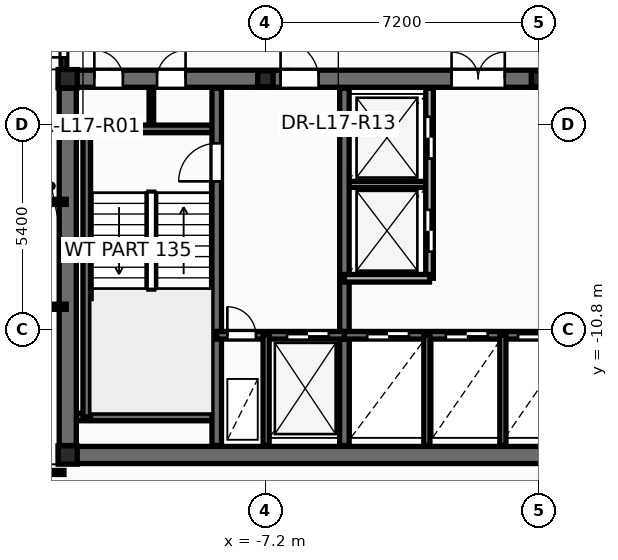
"""IFC4 building model, lengths in metres.
Left out: names, types, materials, properties, quantities, classifications, styles, units other than length and angle.
Written with IfcOpenShell. Run it as: python <this file> out.ifc"""

import sys

from ifc_helpers import new_model, si_unit, direction, frame, frame_2d, origin, origin_2d, place, context, subcontext, project, spatial, rectangle, i_section, extrude, element, fill, save


model = new_model("IFC4")
c1 = context("Model", 3, precision=1e-05, world=origin(), true_north=direction((0.0, 1.0)))
c2 = subcontext(c1, "Body", "Model", "MODEL_VIEW")
j1 = project(units=[si_unit("LENGTHUNIT", "METRE"), si_unit("PLANEANGLEUNIT", "RADIAN")], contexts=[c1])
p1 = place(None, origin())
s1 = spatial("IfcSite", under=j1, at=p1, CompositionType="ELEMENT")
p2 = place(p1, origin())
s2 = spatial("IfcBuilding", under=s1, at=p2, CompositionType="ELEMENT")
p3 = place(p2, frame((0.0, 0.0, 68.4)))
s3 = spatial("IfcBuildingStorey", under=s2, at=p3, CompositionType="ELEMENT", Elevation=68.4)
for number, where, z_axis, x_axis in (
    (1, (-12.4, -14.1, 0.0), (0.0, 0.0, 1.0), (1.0, 0.0, 0.0)),
    (2, (-12.4, -4.2, 0.0), (0.0, 0.0, 1.0), (1.0, 0.0, 0.0)),
):
    element("IfcColumn", number, at=place(p3, frame(where, z_axis=z_axis, x_axis=x_axis)), inside=s3, PredefinedType="COLUMN", context=c2, shape_type="SweptSolid", body=[
        extrude(i_section(OverallWidth=0.5, OverallDepth=0.482, WebThickness=0.04, FlangeThickness=0.045, at=origin_2d()), origin(), (0.0, 0.0, 1.0), 3.6),
    ])
for number, where, z_axis, x_axis in (
    (3, (-7.2, -4.2, 0.0), (0.0, 0.0, 1.0), (1.0, 0.0, 0.0)),
    (4, (0.0, -4.2, 0.0), (0.0, 0.0, 1.0), (1.0, 0.0, 0.0)),
):
    element("IfcColumn", number, at=place(p3, frame(where, z_axis=z_axis, x_axis=x_axis)), inside=s3, PredefinedType="PILASTER", context=c2, shape_type="SweptSolid", body=[
        extrude(i_section(OverallWidth=0.405, OverallDepth=0.414, WebThickness=0.022, FlangeThickness=0.032, at=origin_2d()), origin(), (0.0, 0.0, 1.0), 3.6),
    ])
p4 = place(p3, frame((-5.12, -6.98, 0.0), z_axis=(0.0, 0.0, 1.0), x_axis=(1.0, 0.0, 0.0)))
e5 = element("IfcWall", 5, at=p4, inside=s3, PredefinedType="PARTITIONING", context=c2, shape_type="SweptSolid", body=[
    extrude(rectangle(XDim=2.24, YDim=0.16, at=frame_2d((1.12, 0.0))), origin(), (0.0, 0.0, 1.0), 3.35),
])
p5 = place(p3, frame((-10.2, -5.52, 0.0), z_axis=(0.0, 0.0, 1.0), x_axis=(0.0, 1.0, 0.0)))
e6 = element("IfcWall", 6, at=p5, inside=s3, PredefinedType="PARTITIONING", context=c2, shape_type="SweptSolid", body=[
    extrude(rectangle(XDim=1.12, YDim=0.12, at=frame_2d((0.56, 0.0))), origin(), (0.0, 0.0, 1.0), 3.35),
])
p6 = place(p3, frame((-12.65, -14.1, 0.0), z_axis=(0.0, 0.0, 1.0), x_axis=(1.0, 0.0, 0.0)))
e7 = element("IfcWall", 7, at=p6, inside=s3, PredefinedType="SHEAR", context=c2, shape_type="SweptSolid", body=[
    extrude(rectangle(XDim=25.3, YDim=0.45, at=frame_2d((12.65, 0.0))), origin(), (0.0, 0.0, 1.0), 3.6),
])
p7 = place(p3, frame((-12.65, -4.2, 0.0), z_axis=(0.0, 0.0, 1.0), x_axis=(1.0, 0.0, 0.0)))
e8 = element("IfcWall", 8, at=p7, inside=s3, PredefinedType="SHEAR", context=c2, shape_type="SweptSolid", body=[
    extrude(rectangle(XDim=25.3, YDim=0.45, at=frame_2d((12.65, 0.0))), origin(), (0.0, 0.0, 1.0), 3.6),
])
p8 = place(p7, frame((0.95, 0.0, 0.0)))
e9 = element("IfcOpeningElement", 9, at=p8, cuts=e8, PredefinedType="OPENING", context=c2, shape_type="SweptSolid", body=[
    extrude(rectangle(XDim=0.756, YDim=2.054, at=frame_2d((0.375, 1.027))), frame((0.0, 0.235, 0.0), z_axis=(0.0, -1.0, 0.0), x_axis=(1.0, 0.0, 0.0)), (0.0, 0.0, 1.0), 0.47),
])
p9 = place(p7, frame((2.6, 0.0, 0.0)))
e10 = element("IfcOpeningElement", 10, at=p9, cuts=e8, PredefinedType="OPENING", context=c2, shape_type="SweptSolid", body=[
    extrude(rectangle(XDim=0.756, YDim=2.054, at=frame_2d((0.375, 1.027))), frame((0.0, 0.235, 0.0), z_axis=(0.0, -1.0, 0.0), x_axis=(1.0, 0.0, 0.0)), (0.0, 0.0, 1.0), 0.47),
])
p10 = place(p7, frame((21.85, 0.0, 0.0)))
e11 = element("IfcOpeningElement", 11, at=p10, cuts=e8, PredefinedType="OPENING", context=c2, shape_type="SweptSolid", body=[
    extrude(rectangle(XDim=0.756, YDim=2.054, at=frame_2d((0.375, 1.027))), frame((0.0, 0.235, 0.0), z_axis=(0.0, -1.0, 0.0), x_axis=(1.0, 0.0, 0.0)), (0.0, 0.0, 1.0), 0.47),
])
p11 = place(p7, frame((23.5, 0.0, 0.0)))
e12 = element("IfcOpeningElement", 12, at=p11, cuts=e8, PredefinedType="OPENING", context=c2, shape_type="SweptSolid", body=[
    extrude(rectangle(XDim=0.756, YDim=2.054, at=frame_2d((0.375, 1.027))), frame((0.0, 0.235, 0.0), z_axis=(0.0, -1.0, 0.0), x_axis=(1.0, 0.0, 0.0)), (0.0, 0.0, 1.0), 0.47),
])
p12 = place(p7, frame((5.85, 0.0, 0.0)))
e13 = element("IfcOpeningElement", 13, at=p12, cuts=e8, PredefinedType="OPENING", context=c2, shape_type="SweptSolid", body=[
    extrude(rectangle(XDim=1.006, YDim=2.104, at=frame_2d((0.5, 1.052))), frame((0.0, 0.235, 0.0), z_axis=(0.0, -1.0, 0.0), x_axis=(1.0, 0.0, 0.0)), (0.0, 0.0, 1.0), 0.47),
])
p13 = place(p7, frame((10.35, 0.0, 0.0)))
e14 = element("IfcOpeningElement", 14, at=p13, cuts=e8, PredefinedType="OPENING", context=c2, shape_type="SweptSolid", body=[
    extrude(rectangle(XDim=1.406, YDim=2.154, at=frame_2d((0.7, 1.077))), frame((0.0, 0.235, 0.0), z_axis=(0.0, -1.0, 0.0), x_axis=(1.0, 0.0, 0.0)), (0.0, 0.0, 1.0), 0.47),
])
p14 = place(p7, frame((18.45, 0.0, 0.0)))
e15 = element("IfcOpeningElement", 15, at=p14, cuts=e8, PredefinedType="OPENING", context=c2, shape_type="SweptSolid", body=[
    extrude(rectangle(XDim=1.006, YDim=2.104, at=frame_2d((0.5, 1.052))), frame((0.0, 0.235, 0.0), z_axis=(0.0, -1.0, 0.0), x_axis=(1.0, 0.0, 0.0)), (0.0, 0.0, 1.0), 0.47),
])
for number, where, z_axis, x_axis in (
    (16, (-12.35, -5.52, 0.0), (0.0, 0.0, 1.0), (1.0, 0.0, 0.0)),
    (17, (-12.35, -13.1, 0.0), (0.0, 0.0, 1.0), (1.0, 0.0, 0.0)),
):
    element("IfcWall", number, at=place(p3, frame(where, z_axis=z_axis, x_axis=x_axis)), inside=s3, PredefinedType="SOLIDWALL", context=c2, shape_type="SweptSolid", body=[
        extrude(rectangle(XDim=3.87, YDim=0.2, at=frame_2d((1.935, 0.0))), origin(), (0.0, 0.0, 1.0), 3.6),
    ])
p15 = place(p3, frame((-11.9, -13.1, 0.0), z_axis=(0.0, 0.0, 1.0), x_axis=(0.0, 1.0, 0.0)))
e18 = element("IfcWall", 18, at=p15, inside=s3, PredefinedType="SOLIDWALL", context=c2, shape_type="SweptSolid", body=[
    extrude(rectangle(XDim=7.58, YDim=0.2, at=frame_2d((3.79, 0.0))), origin(), (0.0, 0.0, 1.0), 3.6),
])
p16 = place(p3, frame((-8.48, -13.85, 0.0), z_axis=(0.0, 0.0, 1.0), x_axis=(0.0, 1.0, 0.0)))
e19 = element("IfcWall", 19, at=p16, inside=s3, PredefinedType="SHEAR", context=c2, shape_type="SweptSolid", body=[
    extrude(rectangle(XDim=9.4, YDim=0.25, at=frame_2d((4.7, 0.0))), origin(), (0.0, 0.0, 1.0), 3.6),
])
p17 = place(p16, frame((6.95, 0.0, 0.0)))
e20 = element("IfcOpeningElement", 20, at=p17, cuts=e19, PredefinedType="OPENING", context=c2, shape_type="SweptSolid", body=[
    extrude(rectangle(XDim=1.006, YDim=2.104, at=frame_2d((0.5, 1.052))), frame((0.0, 0.135, 0.0), z_axis=(0.0, -1.0, 0.0), x_axis=(1.0, 0.0, 0.0)), (0.0, 0.0, 1.0), 0.27),
])
p18 = place(p3, frame((-5.12, -13.85, 0.0), z_axis=(0.0, 0.0, 1.0), x_axis=(0.0, 1.0, 0.0)))
e21 = element("IfcWall", 21, at=p18, inside=s3, PredefinedType="SHEAR", context=c2, shape_type="SweptSolid", body=[
    extrude(rectangle(XDim=9.4, YDim=0.25, at=frame_2d((4.7, 0.0))), origin(), (0.0, 0.0, 1.0), 3.6),
])
p19 = place(p3, frame((-8.48, -10.95, 0.0), z_axis=(0.0, 0.0, 1.0), x_axis=(1.0, 0.0, 0.0)))
e22 = element("IfcWall", 22, at=p19, inside=s3, PredefinedType="SOLIDWALL", context=c2, shape_type="SweptSolid", body=[
    extrude(rectangle(XDim=3.36, YDim=0.2, at=frame_2d((1.68, 0.0))), origin(), (0.0, 0.0, 1.0), 3.6),
])
p20 = place(p19, frame((0.28, 0.0, 0.0)))
e23 = element("IfcOpeningElement", 23, at=p20, cuts=e22, PredefinedType="OPENING", context=c2, shape_type="SweptSolid", body=[
    extrude(rectangle(XDim=0.756, YDim=2.054, at=frame_2d((0.375, 1.027))), frame((0.0, 0.11, 0.0), z_axis=(0.0, -1.0, 0.0), x_axis=(1.0, 0.0, 0.0)), (0.0, 0.0, 1.0), 0.22),
])
p21 = place(p19, frame((1.85, 0.0, 0.0)))
e24 = element("IfcOpeningElement", 24, at=p21, cuts=e22, PredefinedType="OPENING", context=c2, shape_type="SweptSolid", body=[
    extrude(rectangle(XDim=1.106, YDim=2.104, at=frame_2d((0.55, 1.052))), frame((0.0, 0.11, 0.0), z_axis=(0.0, -1.0, 0.0), x_axis=(1.0, 0.0, 0.0)), (0.0, 0.0, 1.0), 0.22),
])
p22 = place(p3, frame((-5.12, -10.95, 0.0), z_axis=(0.0, 0.0, 1.0), x_axis=(1.0, 0.0, 0.0)))
e25 = element("IfcWall", 25, at=p22, inside=s3, PredefinedType="SOLIDWALL", context=c2, shape_type="SweptSolid", body=[
    extrude(rectangle(XDim=10.24, YDim=0.2, at=frame_2d((5.12, 0.0))), origin(), (0.0, 0.0, 1.0), 3.6),
])
p23 = place(p22, frame((0.6, 0.0, 0.0)))
e26 = element("IfcOpeningElement", 26, at=p23, cuts=e25, PredefinedType="OPENING", context=c2, shape_type="SweptSolid", body=[
    extrude(rectangle(XDim=1.106, YDim=2.104, at=frame_2d((0.55, 1.052))), frame((0.0, 0.11, 0.0), z_axis=(0.0, -1.0, 0.0), x_axis=(1.0, 0.0, 0.0)), (0.0, 0.0, 1.0), 0.22),
])
p24 = place(p22, frame((2.67, 0.0, 0.0)))
e27 = element("IfcOpeningElement", 27, at=p24, cuts=e25, PredefinedType="OPENING", context=c2, shape_type="SweptSolid", body=[
    extrude(rectangle(XDim=1.106, YDim=2.104, at=frame_2d((0.55, 1.052))), frame((0.0, 0.11, 0.0), z_axis=(0.0, -1.0, 0.0), x_axis=(1.0, 0.0, 0.0)), (0.0, 0.0, 1.0), 0.22),
])
p25 = place(p22, frame((4.57, 0.0, 0.0)))
e28 = element("IfcOpeningElement", 28, at=p25, cuts=e25, PredefinedType="OPENING", context=c2, shape_type="SweptSolid", body=[
    extrude(rectangle(XDim=1.106, YDim=2.104, at=frame_2d((0.55, 1.052))), frame((0.0, 0.11, 0.0), z_axis=(0.0, -1.0, 0.0), x_axis=(1.0, 0.0, 0.0)), (0.0, 0.0, 1.0), 0.22),
])
p26 = place(p22, frame((6.47, 0.0, 0.0)))
e29 = element("IfcOpeningElement", 29, at=p26, cuts=e25, PredefinedType="OPENING", context=c2, shape_type="SweptSolid", body=[
    extrude(rectangle(XDim=1.106, YDim=2.104, at=frame_2d((0.55, 1.052))), frame((0.0, 0.11, 0.0), z_axis=(0.0, -1.0, 0.0), x_axis=(1.0, 0.0, 0.0)), (0.0, 0.0, 1.0), 0.22),
])
p27 = place(p22, frame((8.54, 0.0, 0.0)))
e30 = element("IfcOpeningElement", 30, at=p27, cuts=e25, PredefinedType="OPENING", context=c2, shape_type="SweptSolid", body=[
    extrude(rectangle(XDim=1.106, YDim=2.104, at=frame_2d((0.55, 1.052))), frame((0.0, 0.11, 0.0), z_axis=(0.0, -1.0, 0.0), x_axis=(1.0, 0.0, 0.0)), (0.0, 0.0, 1.0), 0.22),
])
for number, where, z_axis, x_axis in (
    (31, (-7.18, -13.85, 0.0), (0.0, 0.0, 1.0), (0.0, 1.0, 0.0)),
    (32, (-2.95, -13.85, 0.0), (0.0, 0.0, 1.0), (0.0, 1.0, 0.0)),
):
    element("IfcWall", number, at=place(p3, frame(where, z_axis=z_axis, x_axis=x_axis)), inside=s3, PredefinedType="PARTITIONING", context=c2, shape_type="SweptSolid", body=[
        extrude(rectangle(XDim=2.9, YDim=0.16, at=frame_2d((1.45, 0.0))), origin(), (0.0, 0.0, 1.0), 2.375),
    ])
p28 = place(p3, frame((-12.4, -13.85, 0.0), z_axis=(0.0, 0.0, 1.0), x_axis=(0.0, 1.0, 0.0)))
e33 = element("IfcWall", 33, at=p28, inside=s3, PredefinedType="SHEAR", context=c2, shape_type="SweptSolid", body=[
    extrude(rectangle(XDim=9.4, YDim=0.45, at=frame_2d((4.7, 0.0))), origin(), (0.0, 0.0, 1.0), 3.6),
])
p29 = place(p3, frame((-2.88, -9.45, 0.0), z_axis=(0.0, 0.0, 1.0), x_axis=(0.0, 1.0, 0.0)))
e34 = element("IfcWall", 34, at=p29, inside=s3, PredefinedType="SOLIDWALL", context=c2, shape_type="SweptSolid", body=[
    extrude(rectangle(XDim=5.0, YDim=0.2, at=frame_2d((2.5, 0.0))), origin(), (0.0, 0.0, 1.0), 3.35),
])
p30 = place(p29, frame((0.7, 0.0, 0.0)))
e35 = element("IfcOpeningElement", 35, at=p30, cuts=e34, PredefinedType="OPENING", context=c2, shape_type="SweptSolid", body=[
    extrude(rectangle(XDim=1.106, YDim=2.104, at=frame_2d((0.55, 1.052))), frame((0.0, 0.11, 0.0), z_axis=(0.0, -1.0, 0.0), x_axis=(1.0, 0.0, 0.0)), (0.0, 0.0, 1.0), 0.22),
])
p31 = place(p29, frame((3.15, 0.0, 0.0)))
e36 = element("IfcOpeningElement", 36, at=p31, cuts=e34, PredefinedType="OPENING", context=c2, shape_type="SweptSolid", body=[
    extrude(rectangle(XDim=1.106, YDim=2.104, at=frame_2d((0.55, 1.052))), frame((0.0, 0.11, 0.0), z_axis=(0.0, -1.0, 0.0), x_axis=(1.0, 0.0, 0.0)), (0.0, 0.0, 1.0), 0.22),
])
p32 = place(p3, frame((-5.12, -9.45, 0.0), z_axis=(0.0, 0.0, 1.0), x_axis=(1.0, 0.0, 0.0)))
e37 = element("IfcWall", 37, at=p32, inside=s3, PredefinedType="SOLIDWALL", context=c2, shape_type="SweptSolid", body=[
    extrude(rectangle(XDim=2.24, YDim=0.2, at=frame_2d((1.12, 0.0))), origin(), (0.0, 0.0, 1.0), 3.35),
])
p33 = place(p3, frame((-0.95, -13.85, 0.0), z_axis=(0.0, 0.0, 1.0), x_axis=(0.0, 1.0, 0.0)))
e38 = element("IfcWall", 38, at=p33, inside=s3, PredefinedType="PARTITIONING", context=c2, shape_type="SweptSolid", body=[
    extrude(rectangle(XDim=2.9, YDim=0.16, at=frame_2d((1.45, 0.0))), origin(), (0.0, 0.0, 1.0), 2.375),
])
p34 = place(p3, frame((-19.076, -14.56, 0.0), z_axis=(0.0, 0.0, 1.0), x_axis=(1.0, 0.0, 0.0)))
e39 = element("IfcWall", 39, at=p34, inside=s3, PredefinedType="PARTITIONING", context=c2, shape_type="SweptSolid", body=[
    extrude(rectangle(XDim=6.576, YDim=0.105, at=frame_2d((3.288, 0.0))), origin(), (0.0, 0.0, 1.0), 2.713),
])
p35 = place(p34, frame((1.995, 0.0, 0.0)))
e40 = element("IfcOpeningElement", 40, at=p35, cuts=e39, PredefinedType="OPENING", context=c2, shape_type="SweptSolid", body=[
    extrude(rectangle(XDim=0.886, YDim=2.104, at=frame_2d((0.44, 1.052))), frame((0.0, 0.062, 0.0), z_axis=(0.0, -1.0, 0.0), x_axis=(1.0, 0.0, 0.0)), (0.0, 0.0, 1.0), 0.125),
])
p36 = place(p3, frame((-15.078, -7.44, 0.0), z_axis=(0.0, 0.0, 1.0), x_axis=(1.0, 0.0, 0.0)))
e41 = element("IfcWall", 41, at=p36, inside=s3, PredefinedType="PARTITIONING", context=c2, shape_type="SweptSolid", body=[
    extrude(rectangle(XDim=2.638, YDim=0.135, at=frame_2d((1.319, 0.0))), origin(), (0.0, 0.0, 1.0), 2.713),
])
p37 = place(p36, frame((0.271, 0.0, 0.0)))
e42 = element("IfcOpeningElement", 42, at=p37, cuts=e41, PredefinedType="OPENING", context=c2, shape_type="SweptSolid", body=[
    extrude(rectangle(XDim=0.826, YDim=2.104, at=frame_2d((0.41, 1.052))), frame((0.0, 0.078, 0.0), z_axis=(0.0, -1.0, 0.0), x_axis=(1.0, 0.0, 0.0)), (0.0, 0.0, 1.0), 0.155),
])
p38 = place(p3, frame((-15.16, -10.2, 0.0), z_axis=(0.0, 0.0, 1.0), x_axis=(1.0, 0.0, 0.0)))
e43 = element("IfcWall", 43, at=p38, inside=s3, PredefinedType="PARTITIONING", context=c2, shape_type="SweptSolid", body=[
    extrude(rectangle(XDim=2.72, YDim=0.135, at=frame_2d((1.36, 0.0))), origin(), (0.0, 0.0, 1.0), 2.713),
])
p39 = place(p3, frame((-12.5, -4.24, 0.0), z_axis=(0.0, 0.0, 1.0), x_axis=(0.0, 1.0, 0.0)))
e44 = element("IfcWall", 44, at=p39, inside=s3, PredefinedType="PARTITIONING", context=c2, shape_type="SweptSolid", body=[
    extrude(rectangle(XDim=1.6, YDim=0.15, at=frame_2d((0.8, 0.0))), origin(), (0.0, 0.0, 1.0), 2.325),
])
p40 = place(p39, frame((0.602, 0.0, 0.0)))
e45 = element("IfcOpeningElement", 45, at=p40, cuts=e44, PredefinedType="OPENING", context=c2, shape_type="SweptSolid", body=[
    extrude(rectangle(XDim=0.826, YDim=2.104, at=frame_2d((0.41, 1.052))), frame((0.0, 0.085, 0.0), z_axis=(0.0, -1.0, 0.0), x_axis=(1.0, 0.0, 0.0)), (0.0, 0.0, 1.0), 0.17),
])
p41 = place(p30, origin())
e46 = element("IfcDoor", 46, at=p41, inside=s3, OperationType="DOUBLE_DOOR_SLIDING", PredefinedType="DOOR", context=c2, shape_type="SweptSolid", body=[
    extrude(rectangle(XDim=1.1, YDim=2.1, at=frame_2d((0.55, 1.05))), frame((0.0, 0.025, 0.0), z_axis=(0.0, -1.0, 0.0), x_axis=(1.0, 0.0, 0.0)), (0.0, 0.0, 1.0), 0.05),
])
fill(e35, e46)
p42 = place(p31, origin())
e47 = element("IfcDoor", 47, at=p42, inside=s3, OperationType="DOUBLE_DOOR_SLIDING", PredefinedType="DOOR", context=c2, shape_type="SweptSolid", body=[
    extrude(rectangle(XDim=1.1, YDim=2.1, at=frame_2d((0.55, 1.05))), frame((0.0, 0.025, 0.0), z_axis=(0.0, -1.0, 0.0), x_axis=(1.0, 0.0, 0.0)), (0.0, 0.0, 1.0), 0.05),
])
fill(e36, e47)
p43 = place(p17, origin())
e48 = element("IfcDoor", 48, at=p43, inside=s3, OperationType="SINGLE_SWING_LEFT", PredefinedType="DOOR", context=c2, shape_type="SweptSolid", body=[
    extrude(rectangle(XDim=1.0, YDim=2.1, at=frame_2d((0.5, 1.05))), frame((0.0, 0.025, 0.0), z_axis=(0.0, -1.0, 0.0), x_axis=(1.0, 0.0, 0.0)), (0.0, 0.0, 1.0), 0.05),
])
fill(e20, e48)
p44 = place(p20, origin())
e49 = element("IfcDoor", 49, at=p44, inside=s3, OperationType="SINGLE_SWING_LEFT", PredefinedType="DOOR", context=c2, shape_type="SweptSolid", body=[
    extrude(rectangle(XDim=0.75, YDim=2.05, at=frame_2d((0.375, 1.025))), frame((0.0, 0.025, 0.0), z_axis=(0.0, -1.0, 0.0), x_axis=(1.0, 0.0, 0.0)), (0.0, 0.0, 1.0), 0.05),
])
fill(e23, e49)
p45 = place(p21, origin())
e50 = element("IfcDoor", 50, at=p45, inside=s3, OperationType="DOUBLE_DOOR_SLIDING", PredefinedType="DOOR", context=c2, shape_type="SweptSolid", body=[
    extrude(rectangle(XDim=1.1, YDim=2.1, at=frame_2d((0.55, 1.05))), frame((0.0, 0.025, 0.0), z_axis=(0.0, -1.0, 0.0), x_axis=(1.0, 0.0, 0.0)), (0.0, 0.0, 1.0), 0.05),
])
fill(e24, e50)
p46 = place(p23, origin())
e51 = element("IfcDoor", 51, at=p46, inside=s3, OperationType="DOUBLE_DOOR_SLIDING", PredefinedType="DOOR", context=c2, shape_type="SweptSolid", body=[
    extrude(rectangle(XDim=1.1, YDim=2.1, at=frame_2d((0.55, 1.05))), frame((0.0, 0.025, 0.0), z_axis=(0.0, -1.0, 0.0), x_axis=(1.0, 0.0, 0.0)), (0.0, 0.0, 1.0), 0.05),
])
fill(e26, e51)
p47 = place(p24, origin())
e52 = element("IfcDoor", 52, at=p47, inside=s3, OperationType="DOUBLE_DOOR_SLIDING", PredefinedType="DOOR", context=c2, shape_type="SweptSolid", body=[
    extrude(rectangle(XDim=1.1, YDim=2.1, at=frame_2d((0.55, 1.05))), frame((0.0, 0.025, 0.0), z_axis=(0.0, -1.0, 0.0), x_axis=(1.0, 0.0, 0.0)), (0.0, 0.0, 1.0), 0.05),
])
fill(e27, e52)
p48 = place(p25, origin())
e53 = element("IfcDoor", 53, at=p48, inside=s3, OperationType="DOUBLE_DOOR_SLIDING", PredefinedType="DOOR", context=c2, shape_type="SweptSolid", body=[
    extrude(rectangle(XDim=1.1, YDim=2.1, at=frame_2d((0.55, 1.05))), frame((0.0, 0.025, 0.0), z_axis=(0.0, -1.0, 0.0), x_axis=(1.0, 0.0, 0.0)), (0.0, 0.0, 1.0), 0.05),
])
fill(e28, e53)
p49 = place(p8, origin())
e54 = element("IfcDoor", 54, at=p49, inside=s3, OperationType="SINGLE_SWING_LEFT", PredefinedType="DOOR", context=c2, shape_type="SweptSolid", body=[
    extrude(rectangle(XDim=0.75, YDim=2.05, at=frame_2d((0.375, 1.025))), frame((0.0, 0.025, 0.0), z_axis=(0.0, -1.0, 0.0), x_axis=(1.0, 0.0, 0.0)), (0.0, 0.0, 1.0), 0.05),
])
fill(e9, e54)
p50 = place(p9, origin())
e55 = element("IfcDoor", 55, at=p50, inside=s3, OperationType="SINGLE_SWING_RIGHT", PredefinedType="DOOR", context=c2, shape_type="SweptSolid", body=[
    extrude(rectangle(XDim=0.75, YDim=2.05, at=frame_2d((0.375, 1.025))), frame((0.0, 0.025, 0.0), z_axis=(0.0, -1.0, 0.0), x_axis=(1.0, 0.0, 0.0)), (0.0, 0.0, 1.0), 0.05),
])
fill(e10, e55)
p51 = place(p12, origin())
e56 = element("IfcDoor", 56, at=p51, inside=s3, OperationType="SINGLE_SWING_LEFT", PredefinedType="DOOR", context=c2, shape_type="SweptSolid", body=[
    extrude(rectangle(XDim=1.0, YDim=2.1, at=frame_2d((0.5, 1.05))), frame((0.0, 0.025, 0.0), z_axis=(0.0, -1.0, 0.0), x_axis=(1.0, 0.0, 0.0)), (0.0, 0.0, 1.0), 0.05),
])
fill(e13, e56)
p52 = place(p13, origin())
e57 = element("IfcDoor", 57, at=p52, inside=s3, OperationType="DOUBLE_DOOR_SINGLE_SWING", PredefinedType="DOOR", context=c2, shape_type="SweptSolid", body=[
    extrude(rectangle(XDim=1.4, YDim=2.15, at=frame_2d((0.7, 1.075))), frame((0.0, 0.025, 0.0), z_axis=(0.0, -1.0, 0.0), x_axis=(1.0, 0.0, 0.0)), (0.0, 0.0, 1.0), 0.05),
])
fill(e14, e57)
p53 = place(p40, origin())
e58 = element("IfcDoor", 58, at=p53, inside=s3, OperationType="SINGLE_SWING_LEFT", PredefinedType="DOOR", context=c2, shape_type="SweptSolid", body=[
    extrude(rectangle(XDim=0.82, YDim=2.1, at=frame_2d((0.41, 1.05))), frame((0.0, 0.025, 0.0), z_axis=(0.0, -1.0, 0.0), x_axis=(1.0, 0.0, 0.0)), (0.0, 0.0, 1.0), 0.05),
])
fill(e45, e58)
save(model, sys.argv[1])
